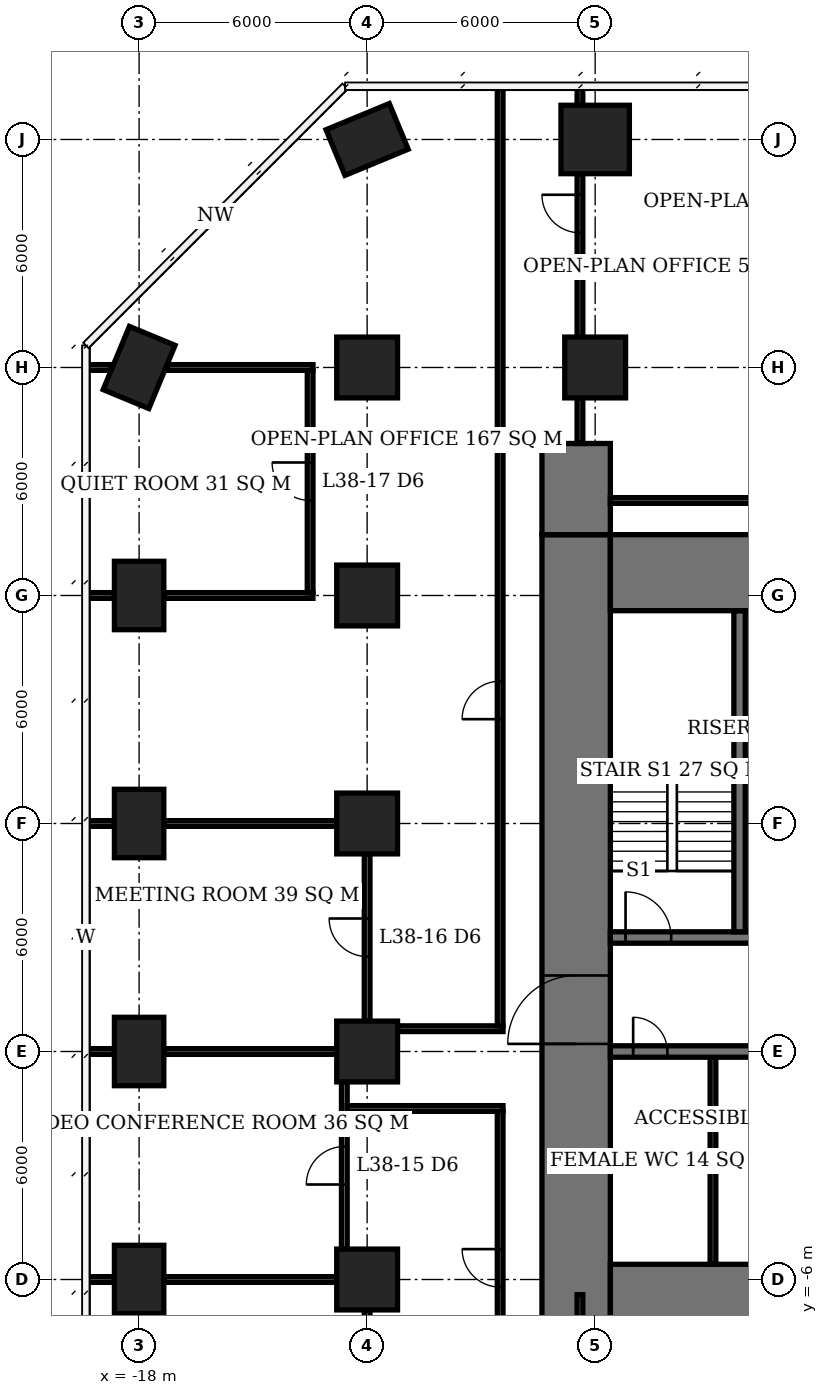
"""IFC4 building model, lengths in metres.
Left out: names, types, materials, properties, quantities, classifications, styles, units other than length and angle.
Written with IfcOpenShell. Run it as: python <this file> out.ifc"""

import sys

from ifc_helpers import new_model, si_unit, direction, frame, frame_2d, origin, origin_2d, place, context, subcontext, project, spatial, rectangle, extrude, element, fill, save


model = new_model("IFC4")
c1 = context("Model", 3, precision=1e-05, world=origin(), true_north=direction((0.0, 1.0)))
c2 = subcontext(c1, "Body", "Model", "MODEL_VIEW")
j1 = project(units=[si_unit("LENGTHUNIT", "METRE"), si_unit("PLANEANGLEUNIT", "RADIAN")], contexts=[c1])
p1 = place(None, origin())
s1 = spatial("IfcSite", under=j1, at=p1, CompositionType="ELEMENT")
p2 = place(p1, origin())
s2 = spatial("IfcBuilding", under=s1, at=p2, CompositionType="ELEMENT")
p3 = place(p2, frame((0.0, 0.0, 156.2)))
s3 = spatial("IfcBuildingStorey", under=s2, at=p3, CompositionType="ELEMENT", Elevation=156.2)
for number, where, z_axis, x_axis in (
    (1, (-18.0, -6.0, 0.0), (0.0, 0.0, 1.0), (0.0, 1.0, 0.0)),
    (2, (-18.0, 0.0, 0.0), (0.0, 0.0, 1.0), (0.0, 1.0, 0.0)),
    (3, (-18.0, 6.0, 0.0), (0.0, 0.0, 1.0), (0.0, 1.0, 0.0)),
    (4, (-18.0, 12.0, 0.0), (0.0, 0.0, 1.0), (0.0, 1.0, 0.0)),
    (5, (-18.0, 18.0, 0.0), (0.0, 0.0, 1.0), (0.383, 0.924, 0.0)),
):
    element("IfcColumn", number, at=place(p3, frame(where, z_axis=z_axis, x_axis=x_axis)), inside=s3, PredefinedType="COLUMN", context=c2, shape_type="SweptSolid", body=[
        extrude(rectangle(XDim=1.8, YDim=1.3, at=origin_2d()), origin(), (0.0, 0.0, 1.0), 3.9),
    ])
for number, where, z_axis, x_axis in (
    (6, (-12.0, -6.0, 0.0), (0.0, 0.0, 1.0), (1.0, 0.0, 0.0)),
    (7, (-12.0, 0.0, 0.0), (0.0, 0.0, 1.0), (1.0, 0.0, 0.0)),
    (8, (-12.0, 6.0, 0.0), (0.0, 0.0, 1.0), (1.0, 0.0, 0.0)),
    (9, (-12.0, 12.0, 0.0), (0.0, 0.0, 1.0), (1.0, 0.0, 0.0)),
    (10, (-12.0, 18.0, 0.0), (0.0, 0.0, 1.0), (1.0, 0.0, 0.0)),
):
    element("IfcColumn", number, at=place(p3, frame(where, z_axis=z_axis, x_axis=x_axis)), inside=s3, PredefinedType="COLUMN", context=c2, shape_type="SweptSolid", body=[
        extrude(rectangle(XDim=1.6, YDim=1.6, at=origin_2d()), origin(), (0.0, 0.0, 1.0), 3.9),
    ])
p4 = place(p3, frame((-12.0, 24.0, 0.0), z_axis=(0.0, 0.0, 1.0), x_axis=(0.923879532511, 0.382683432365, 0.0)))
e11 = element("IfcColumn", 11, at=p4, inside=s3, PredefinedType="COLUMN", context=c2, shape_type="SweptSolid", body=[
    extrude(rectangle(XDim=1.8, YDim=1.3, at=origin_2d()), origin(), (0.0, 0.0, 1.0), 3.9),
])
p5 = place(p3, frame((-6.0, 18.0, 0.0), z_axis=(0.0, 0.0, 1.0), x_axis=(1.0, 0.0, 0.0)))
e12 = element("IfcColumn", 12, at=p5, inside=s3, PredefinedType="COLUMN", context=c2, shape_type="SweptSolid", body=[
    extrude(rectangle(XDim=1.6, YDim=1.6, at=origin_2d()), origin(), (0.0, 0.0, 1.0), 3.9),
])
p6 = place(p3, frame((-6.0, 24.0, 0.0), z_axis=(0.0, 0.0, 1.0), x_axis=(1.0, 0.0, 0.0)))
e13 = element("IfcColumn", 13, at=p6, inside=s3, PredefinedType="COLUMN", context=c2, shape_type="SweptSolid", body=[
    extrude(rectangle(XDim=1.8, YDim=1.8, at=origin_2d()), origin(), (0.0, 0.0, 1.0), 3.9),
])
for number, where, z_axis, x_axis in (
    (14, (-5.6, -6.6, 0.0), (0.0, 0.0, 1.0), (1.0, 0.0, 0.0)),
    (15, (-5.6, 12.6, 0.0), (0.0, 0.0, 1.0), (1.0, 0.0, 0.0)),
):
    element("IfcWall", number, at=place(p3, frame(where, z_axis=z_axis, x_axis=x_axis)), inside=s3, PredefinedType="SHEAR", context=c2, shape_type="SweptSolid", body=[
        extrude(rectangle(XDim=23.2, YDim=2.0, at=frame_2d((11.6, 0.0))), origin(), (0.0, 0.0, 1.0), 3.9),
    ])
p7 = place(p3, frame((-6.5, -7.6, 0.0), z_axis=(0.0, 0.0, 1.0), x_axis=(0.0, 1.0, 0.0)))
e16 = element("IfcWall", 16, at=p7, inside=s3, PredefinedType="SHEAR", context=c2, shape_type="SweptSolid", body=[
    extrude(rectangle(XDim=21.2, YDim=1.8, at=frame_2d((10.6, 0.0))), origin(), (0.0, 0.0, 1.0), 3.9),
])
p8 = place(p7, frame((7.8, 0.0, 0.0)))
e17 = element("IfcOpeningElement", 17, at=p8, cuts=e16, PredefinedType="OPENING", context=c2, shape_type="SweptSolid", body=[
    extrude(rectangle(XDim=1.8, YDim=2.4, at=frame_2d((0.9, 1.2))), frame((0.0, 0.91, 0.0), z_axis=(0.0, -1.0, 0.0), x_axis=(1.0, 0.0, 0.0)), (0.0, 0.0, 1.0), 1.82),
])
p9 = place(p3, frame((-6.5, 13.6, 0.0), z_axis=(0.0, 0.0, 1.0), x_axis=(0.0, 1.0, 0.0)))
e18 = element("IfcWall", 18, at=p9, inside=s3, PredefinedType="SHEAR", context=c2, shape_type="SweptSolid", body=[
    extrude(rectangle(XDim=2.4, YDim=1.8, at=frame_2d((1.2, 0.0))), origin(), (0.0, 0.0, 1.0), 3.9),
])
p10 = place(p3, frame((-5.6, 0.0, 0.0), z_axis=(0.0, 0.0, 1.0), x_axis=(1.0, 0.0, 0.0)))
e19 = element("IfcWall", 19, at=p10, inside=s3, PredefinedType="SHEAR", context=c2, shape_type="SweptSolid", body=[
    extrude(rectangle(XDim=17.75, YDim=0.3, at=frame_2d((8.875, 0.0))), origin(), (0.0, 0.0, 1.0), 3.9),
])
p11 = place(p10, frame((0.6, 0.0, 0.0)))
e20 = element("IfcOpeningElement", 20, at=p11, cuts=e19, PredefinedType="OPENING", context=c2, shape_type="SweptSolid", body=[
    extrude(rectangle(XDim=0.9, YDim=2.1, at=frame_2d((0.45, 1.05))), frame((0.0, 0.16, 0.0), z_axis=(0.0, -1.0, 0.0), x_axis=(1.0, 0.0, 0.0)), (0.0, 0.0, 1.0), 0.32),
])
p12 = place(p10, frame((3.7, 0.0, 0.0)))
e21 = element("IfcOpeningElement", 21, at=p12, cuts=e19, PredefinedType="OPENING", context=c2, shape_type="SweptSolid", body=[
    extrude(rectangle(XDim=1.0, YDim=2.1, at=frame_2d((0.5, 1.05))), frame((0.0, 0.16, 0.0), z_axis=(0.0, -1.0, 0.0), x_axis=(1.0, 0.0, 0.0)), (0.0, 0.0, 1.0), 0.32),
])
p13 = place(p10, frame((6.55, 0.0, 0.0)))
e22 = element("IfcOpeningElement", 22, at=p13, cuts=e19, PredefinedType="OPENING", context=c2, shape_type="SweptSolid", body=[
    extrude(rectangle(XDim=1.1, YDim=2.1, at=frame_2d((0.55, 1.05))), frame((0.0, 0.16, 0.0), z_axis=(0.0, -1.0, 0.0), x_axis=(1.0, 0.0, 0.0)), (0.0, 0.0, 1.0), 0.32),
])
p14 = place(p10, frame((9.55, 0.0, 0.0)))
e23 = element("IfcOpeningElement", 23, at=p14, cuts=e19, PredefinedType="OPENING", context=c2, shape_type="SweptSolid", body=[
    extrude(rectangle(XDim=1.1, YDim=2.1, at=frame_2d((0.55, 1.05))), frame((0.0, 0.16, 0.0), z_axis=(0.0, -1.0, 0.0), x_axis=(1.0, 0.0, 0.0)), (0.0, 0.0, 1.0), 0.32),
])
p15 = place(p3, frame((-5.6, 3.0, 0.0), z_axis=(0.0, 0.0, 1.0), x_axis=(1.0, 0.0, 0.0)))
e24 = element("IfcWall", 24, at=p15, inside=s3, PredefinedType="SHEAR", context=c2, shape_type="SweptSolid", body=[
    extrude(rectangle(XDim=5.45, YDim=0.3, at=frame_2d((2.725, 0.0))), origin(), (0.0, 0.0, 1.0), 3.9),
])
p16 = place(p15, frame((0.4, 0.0, 0.0)))
e25 = element("IfcOpeningElement", 25, at=p16, cuts=e24, PredefinedType="OPENING", context=c2, shape_type="SweptSolid", body=[
    extrude(rectangle(XDim=1.2, YDim=2.1, at=frame_2d((0.6, 1.05))), frame((0.0, 0.16, 0.0), z_axis=(0.0, -1.0, 0.0), x_axis=(1.0, 0.0, 0.0)), (0.0, 0.0, 1.0), 0.32),
])
p17 = place(p15, frame((3.95, 0.0, 0.0)))
e26 = element("IfcOpeningElement", 26, at=p17, cuts=e24, PredefinedType="OPENING", context=c2, shape_type="SweptSolid", body=[
    extrude(rectangle(XDim=0.9, YDim=2.1, at=frame_2d((0.45, 1.05))), frame((0.0, 0.16, 0.0), z_axis=(0.0, -1.0, 0.0), x_axis=(1.0, 0.0, 0.0)), (0.0, 0.0, 1.0), 0.32),
])
p18 = place(p3, frame((-2.2, 3.15, 0.0), z_axis=(0.0, 0.0, 1.0), x_axis=(0.0, 1.0, 0.0)))
e27 = element("IfcWall", 27, at=p18, inside=s3, PredefinedType="SHEAR", context=c2, shape_type="SweptSolid", body=[
    extrude(rectangle(XDim=8.45, YDim=0.3, at=frame_2d((4.225, 0.0))), origin(), (0.0, 0.0, 1.0), 3.9),
])
p19 = place(p3, frame((-2.9, -5.6, 0.0), z_axis=(0.0, 0.0, 1.0), x_axis=(0.0, 1.0, 0.0)))
e28 = element("IfcWall", 28, at=p19, inside=s3, PredefinedType="PLUMBINGWALL", context=c2, shape_type="SweptSolid", body=[
    extrude(rectangle(XDim=5.45, YDim=0.15, at=frame_2d((2.725, 0.0))), origin(), (0.0, 0.0, 1.0), 3.65),
])
p20 = place(p3, frame((-19.4, -6.0, 0.0), z_axis=(0.0, 0.0, 1.0), x_axis=(1.0, 0.0, 0.0)))
e29 = element("IfcWall", 29, at=p20, inside=s3, PredefinedType="PARTITIONING", context=c2, shape_type="SweptSolid", body=[
    extrude(rectangle(XDim=0.75, YDim=0.15, at=frame_2d((0.375, 0.0))), origin(), (0.0, 0.0, 1.0), 3.65),
])
p21 = place(p3, frame((-17.35, -6.0, 0.0), z_axis=(0.0, 0.0, 1.0), x_axis=(1.0, 0.0, 0.0)))
e30 = element("IfcWall", 30, at=p21, inside=s3, PredefinedType="PARTITIONING", context=c2, shape_type="SweptSolid", body=[
    extrude(rectangle(XDim=4.55, YDim=0.15, at=frame_2d((2.275, 0.0))), origin(), (0.0, 0.0, 1.0), 3.65),
])
p22 = place(p3, frame((-19.35, 0.0, 0.0), z_axis=(0.0, 0.0, 1.0), x_axis=(1.0, 0.0, 0.0)))
e31 = element("IfcWall", 31, at=p22, inside=s3, PredefinedType="PARTITIONING", context=c2, shape_type="SweptSolid", body=[
    extrude(rectangle(XDim=0.7, YDim=0.15, at=frame_2d((0.35, 0.0))), origin(), (0.0, 0.0, 1.0), 3.65),
])
p23 = place(p3, frame((-17.35, 0.0, 0.0), z_axis=(0.0, 0.0, 1.0), x_axis=(1.0, 0.0, 0.0)))
e32 = element("IfcWall", 32, at=p23, inside=s3, PredefinedType="PARTITIONING", context=c2, shape_type="SweptSolid", body=[
    extrude(rectangle(XDim=4.55, YDim=0.15, at=frame_2d((2.275, 0.0))), origin(), (0.0, 0.0, 1.0), 3.65),
])
p24 = place(p3, frame((-19.35, 6.0, 0.0), z_axis=(0.0, 0.0, 1.0), x_axis=(1.0, 0.0, 0.0)))
e33 = element("IfcWall", 33, at=p24, inside=s3, PredefinedType="PARTITIONING", context=c2, shape_type="SweptSolid", body=[
    extrude(rectangle(XDim=0.7, YDim=0.15, at=frame_2d((0.35, 0.0))), origin(), (0.0, 0.0, 1.0), 3.65),
])
p25 = place(p3, frame((-17.35, 6.0, 0.0), z_axis=(0.0, 0.0, 1.0), x_axis=(1.0, 0.0, 0.0)))
e34 = element("IfcWall", 34, at=p25, inside=s3, PredefinedType="PARTITIONING", context=c2, shape_type="SweptSolid", body=[
    extrude(rectangle(XDim=4.55, YDim=0.15, at=frame_2d((2.275, 0.0))), origin(), (0.0, 0.0, 1.0), 3.65),
])
p26 = place(p3, frame((-19.4, 12.0, 0.0), z_axis=(0.0, 0.0, 1.0), x_axis=(1.0, 0.0, 0.0)))
e35 = element("IfcWall", 35, at=p26, inside=s3, PredefinedType="PARTITIONING", context=c2, shape_type="SweptSolid", body=[
    extrude(rectangle(XDim=0.75, YDim=0.15, at=frame_2d((0.375, 0.0))), origin(), (0.0, 0.0, 1.0), 3.65),
])
p27 = place(p3, frame((-17.35, 12.0, 0.0), z_axis=(0.0, 0.0, 1.0), x_axis=(1.0, 0.0, 0.0)))
e36 = element("IfcWall", 36, at=p27, inside=s3, PredefinedType="PARTITIONING", context=c2, shape_type="SweptSolid", body=[
    extrude(rectangle(XDim=3.925, YDim=0.15, at=frame_2d((1.962, 0.0))), origin(), (0.0, 0.0, 1.0), 3.65),
])
p28 = place(p3, frame((-19.4, 18.0, 0.0), z_axis=(0.0, 0.0, 1.0), x_axis=(1.0, 0.0, 0.0)))
e37 = element("IfcWall", 37, at=p28, inside=s3, PredefinedType="PARTITIONING", context=c2, shape_type="SweptSolid", body=[
    extrude(rectangle(XDim=0.665, YDim=0.15, at=frame_2d((0.333, 0.0))), origin(), (0.0, 0.0, 1.0), 3.65),
])
p29 = place(p3, frame((-17.265, 18.0, 0.0), z_axis=(0.0, 0.0, 1.0), x_axis=(1.0, 0.0, 0.0)))
e38 = element("IfcWall", 38, at=p29, inside=s3, PredefinedType="PARTITIONING", context=c2, shape_type="SweptSolid", body=[
    extrude(rectangle(XDim=3.84, YDim=0.15, at=frame_2d((1.92, 0.0))), origin(), (0.0, 0.0, 1.0), 3.65),
])
p30 = place(p3, frame((-13.5, 12.075, 0.0), z_axis=(0.0, 0.0, 1.0), x_axis=(0.0, 1.0, 0.0)))
e39 = element("IfcWall", 39, at=p30, inside=s3, PredefinedType="PARTITIONING", context=c2, shape_type="SweptSolid", body=[
    extrude(rectangle(XDim=5.85, YDim=0.15, at=frame_2d((2.925, 0.0))), origin(), (0.0, 0.0, 1.0), 3.65),
])
p31 = place(p30, frame((2.425, 0.0, 0.0)))
e40 = element("IfcOpeningElement", 40, at=p31, cuts=e39, PredefinedType="OPENING", context=c2, shape_type="SweptSolid", body=[
    extrude(rectangle(XDim=1.0, YDim=2.1, at=frame_2d((0.5, 1.05))), frame((0.0, 0.085, 0.0), z_axis=(0.0, -1.0, 0.0), x_axis=(1.0, 0.0, 0.0)), (0.0, 0.0, 1.0), 0.17),
])
p32 = place(p3, frame((-12.6, -5.2, 0.0), z_axis=(0.0, 0.0, 1.0), x_axis=(0.0, 1.0, 0.0)))
e41 = element("IfcWall", 41, at=p32, inside=s3, PredefinedType="PARTITIONING", context=c2, shape_type="SweptSolid", body=[
    extrude(rectangle(XDim=4.4, YDim=0.15, at=frame_2d((2.2, 0.0))), origin(), (0.0, 0.0, 1.0), 3.65),
])
p33 = place(p32, frame((1.7, 0.0, 0.0)))
e42 = element("IfcOpeningElement", 42, at=p33, cuts=e41, PredefinedType="OPENING", context=c2, shape_type="SweptSolid", body=[
    extrude(rectangle(XDim=1.0, YDim=2.1, at=frame_2d((0.5, 1.05))), frame((0.0, 0.085, 0.0), z_axis=(0.0, -1.0, 0.0), x_axis=(1.0, 0.0, 0.0)), (0.0, 0.0, 1.0), 0.17),
])
p34 = place(p3, frame((-12.0, -11.2, 0.0), z_axis=(0.0, 0.0, 1.0), x_axis=(0.0, 1.0, 0.0)))
e43 = element("IfcWall", 43, at=p34, inside=s3, PredefinedType="PARTITIONING", context=c2, shape_type="SweptSolid", body=[
    extrude(rectangle(XDim=4.4, YDim=0.15, at=frame_2d((2.2, 0.0))), origin(), (0.0, 0.0, 1.0), 3.65),
])
p35 = place(p34, frame((1.7, 0.0, 0.0)))
e44 = element("IfcOpeningElement", 44, at=p35, cuts=e43, PredefinedType="OPENING", context=c2, shape_type="SweptSolid", body=[
    extrude(rectangle(XDim=1.0, YDim=2.1, at=frame_2d((0.5, 1.05))), frame((0.0, 0.085, 0.0), z_axis=(0.0, -1.0, 0.0), x_axis=(1.0, 0.0, 0.0)), (0.0, 0.0, 1.0), 0.17),
])
p36 = place(p3, frame((-12.0, 0.8, 0.0), z_axis=(0.0, 0.0, 1.0), x_axis=(0.0, 1.0, 0.0)))
e45 = element("IfcWall", 45, at=p36, inside=s3, PredefinedType="PARTITIONING", context=c2, shape_type="SweptSolid", body=[
    extrude(rectangle(XDim=4.4, YDim=0.15, at=frame_2d((2.2, 0.0))), origin(), (0.0, 0.0, 1.0), 3.65),
])
p37 = place(p36, frame((1.7, 0.0, 0.0)))
e46 = element("IfcOpeningElement", 46, at=p37, cuts=e45, PredefinedType="OPENING", context=c2, shape_type="SweptSolid", body=[
    extrude(rectangle(XDim=1.0, YDim=2.1, at=frame_2d((0.5, 1.05))), frame((0.0, 0.085, 0.0), z_axis=(0.0, -1.0, 0.0), x_axis=(1.0, 0.0, 0.0)), (0.0, 0.0, 1.0), 0.17),
])
p38 = place(p3, frame((-12.525, -1.5, 0.0), z_axis=(0.0, 0.0, 1.0), x_axis=(1.0, 0.0, 0.0)))
e47 = element("IfcWall", 47, at=p38, inside=s3, PredefinedType="PARTITIONING", context=c2, shape_type="SweptSolid", body=[
    extrude(rectangle(XDim=4.1, YDim=0.15, at=frame_2d((2.05, 0.0))), origin(), (0.0, 0.0, 1.0), 3.65),
])
p39 = place(p3, frame((-11.2, 0.6, 0.0), z_axis=(0.0, 0.0, 1.0), x_axis=(1.0, 0.0, 0.0)))
e48 = element("IfcWall", 48, at=p39, inside=s3, PredefinedType="PARTITIONING", context=c2, shape_type="SweptSolid", body=[
    extrude(rectangle(XDim=2.775, YDim=0.15, at=frame_2d((1.387, 0.0))), origin(), (0.0, 0.0, 1.0), 3.65),
])
p40 = place(p3, frame((-8.5, -13.425, 0.0), z_axis=(0.0, 0.0, 1.0), x_axis=(0.0, 1.0, 0.0)))
e49 = element("IfcWall", 49, at=p40, inside=s3, PredefinedType="PARTITIONING", context=c2, shape_type="SweptSolid", body=[
    extrude(rectangle(XDim=11.85, YDim=0.15, at=frame_2d((5.925, 0.0))), origin(), (0.0, 0.0, 1.0), 3.65),
])
p41 = place(p40, frame((7.225, 0.0, 0.0)))
e50 = element("IfcOpeningElement", 50, at=p41, cuts=e49, PredefinedType="OPENING", context=c2, shape_type="SweptSolid", body=[
    extrude(rectangle(XDim=1.0, YDim=2.1, at=frame_2d((0.5, 1.05))), frame((0.0, 0.085, 0.0), z_axis=(0.0, -1.0, 0.0), x_axis=(1.0, 0.0, 0.0)), (0.0, 0.0, 1.0), 0.17),
])
p42 = place(p3, frame((-8.5, 0.675, 0.0), z_axis=(0.0, 0.0, 1.0), x_axis=(0.0, 1.0, 0.0)))
e51 = element("IfcWall", 51, at=p42, inside=s3, PredefinedType="PARTITIONING", context=c2, shape_type="SweptSolid", body=[
    extrude(rectangle(XDim=24.725, YDim=0.15, at=frame_2d((12.362, 0.0))), origin(), (0.0, 0.0, 1.0), 3.65),
])
p43 = place(p42, frame((8.07, 0.0, 0.0)))
e52 = element("IfcOpeningElement", 52, at=p43, cuts=e51, PredefinedType="OPENING", context=c2, shape_type="SweptSolid", body=[
    extrude(rectangle(XDim=1.0, YDim=2.1, at=frame_2d((0.5, 1.05))), frame((0.0, 0.085, 0.0), z_axis=(0.0, -1.0, 0.0), x_axis=(1.0, 0.0, 0.0)), (0.0, 0.0, 1.0), 0.17),
])
p44 = place(p3, frame((-6.4, -7.6, 0.0), z_axis=(0.0, 0.0, 1.0), x_axis=(0.0, 1.0, 0.0)))
e53 = element("IfcWall", 53, at=p44, inside=s3, PredefinedType="PARTITIONING", context=c2, shape_type="SweptSolid", body=[
    extrude(rectangle(XDim=1.2, YDim=0.15, at=frame_2d((0.6, 0.0))), origin(), (0.0, 0.0, 1.0), 3.65),
])
p45 = place(p3, frame((-6.4, 16.0, 0.0), z_axis=(0.0, 0.0, 1.0), x_axis=(0.0, 1.0, 0.0)))
e54 = element("IfcWall", 54, at=p45, inside=s3, PredefinedType="PARTITIONING", context=c2, shape_type="SweptSolid", body=[
    extrude(rectangle(XDim=1.2, YDim=0.15, at=frame_2d((0.6, 0.0))), origin(), (0.0, 0.0, 1.0), 3.65),
])
p46 = place(p3, frame((-6.4, 18.8, 0.0), z_axis=(0.0, 0.0, 1.0), x_axis=(0.0, 1.0, 0.0)))
e55 = element("IfcWall", 55, at=p46, inside=s3, PredefinedType="PARTITIONING", context=c2, shape_type="SweptSolid", body=[
    extrude(rectangle(XDim=4.3, YDim=0.15, at=frame_2d((2.15, 0.0))), origin(), (0.0, 0.0, 1.0), 3.65),
])
p47 = place(p46, frame((2.745, 0.0, 0.0)))
e56 = element("IfcOpeningElement", 56, at=p47, cuts=e55, PredefinedType="OPENING", context=c2, shape_type="SweptSolid", body=[
    extrude(rectangle(XDim=1.0, YDim=2.1, at=frame_2d((0.5, 1.05))), frame((0.0, 0.085, 0.0), z_axis=(0.0, -1.0, 0.0), x_axis=(1.0, 0.0, 0.0)), (0.0, 0.0, 1.0), 0.17),
])
p48 = place(p3, frame((-6.4, 24.9, 0.0), z_axis=(0.0, 0.0, 1.0), x_axis=(0.0, 1.0, 0.0)))
e57 = element("IfcWall", 57, at=p48, inside=s3, PredefinedType="PARTITIONING", context=c2, shape_type="SweptSolid", body=[
    extrude(rectangle(XDim=0.45, YDim=0.15, at=frame_2d((0.225, 0.0))), origin(), (0.0, 0.0, 1.0), 3.65),
])
p49 = place(p3, frame((-5.6, 14.5, 0.0), z_axis=(0.0, 0.0, 1.0), x_axis=(1.0, 0.0, 0.0)))
e58 = element("IfcWall", 58, at=p49, inside=s3, PredefinedType="PARTITIONING", context=c2, shape_type="SweptSolid", body=[
    extrude(rectangle(XDim=4.1, YDim=0.15, at=frame_2d((2.05, 0.0))), origin(), (0.0, 0.0, 1.0), 3.65),
])
p50 = place(p8, origin())
e59 = element("IfcDoor", 59, at=p50, inside=s3, OperationType="DOUBLE_DOOR_SINGLE_SWING", PredefinedType="DOOR", context=c2, shape_type="SweptSolid", body=[
    extrude(rectangle(XDim=1.8, YDim=2.4, at=frame_2d((0.9, 1.2))), frame((0.0, 0.025, 0.0), z_axis=(0.0, -1.0, 0.0), x_axis=(1.0, 0.0, 0.0)), (0.0, 0.0, 1.0), 0.05),
])
fill(e17, e59)
p51 = place(p16, origin())
e60 = element("IfcDoor", 60, at=p51, inside=s3, OperationType="SINGLE_SWING_LEFT", PredefinedType="DOOR", context=c2, shape_type="SweptSolid", body=[
    extrude(rectangle(XDim=1.2, YDim=2.1, at=frame_2d((0.6, 1.05))), frame((0.0, 0.025, 0.0), z_axis=(0.0, -1.0, 0.0), x_axis=(1.0, 0.0, 0.0)), (0.0, 0.0, 1.0), 0.05),
])
fill(e25, e60)
p52 = place(p11, origin())
e61 = element("IfcDoor", 61, at=p52, inside=s3, OperationType="SINGLE_SWING_LEFT", PredefinedType="DOOR", context=c2, shape_type="SweptSolid", body=[
    extrude(rectangle(XDim=0.9, YDim=2.1, at=frame_2d((0.45, 1.05))), frame((0.0, 0.025, 0.0), z_axis=(0.0, -1.0, 0.0), x_axis=(1.0, 0.0, 0.0)), (0.0, 0.0, 1.0), 0.05),
])
fill(e20, e61)
p53 = place(p33, origin())
e62 = element("IfcDoor", 62, at=p53, inside=s3, OperationType="SINGLE_SWING_LEFT", PredefinedType="DOOR", context=c2, shape_type="SweptSolid", body=[
    extrude(rectangle(XDim=1.0, YDim=2.1, at=frame_2d((0.5, 1.05))), frame((0.0, 0.025, 0.0), z_axis=(0.0, -1.0, 0.0), x_axis=(1.0, 0.0, 0.0)), (0.0, 0.0, 1.0), 0.05),
])
fill(e42, e62)
p54 = place(p37, origin())
e63 = element("IfcDoor", 63, at=p54, inside=s3, OperationType="SINGLE_SWING_RIGHT", PredefinedType="DOOR", context=c2, shape_type="SweptSolid", body=[
    extrude(rectangle(XDim=1.0, YDim=2.1, at=frame_2d((0.5, 1.05))), frame((0.0, 0.025, 0.0), z_axis=(0.0, -1.0, 0.0), x_axis=(1.0, 0.0, 0.0)), (0.0, 0.0, 1.0), 0.05),
])
fill(e46, e63)
p55 = place(p31, origin())
e64 = element("IfcDoor", 64, at=p55, inside=s3, OperationType="SINGLE_SWING_RIGHT", PredefinedType="DOOR", context=c2, shape_type="SweptSolid", body=[
    extrude(rectangle(XDim=1.0, YDim=2.1, at=frame_2d((0.5, 1.05))), frame((0.0, 0.025, 0.0), z_axis=(0.0, -1.0, 0.0), x_axis=(1.0, 0.0, 0.0)), (0.0, 0.0, 1.0), 0.05),
])
fill(e40, e64)
p56 = place(p41, origin())
e65 = element("IfcDoor", 65, at=p56, inside=s3, OperationType="SINGLE_SWING_RIGHT", PredefinedType="DOOR", context=c2, shape_type="SweptSolid", body=[
    extrude(rectangle(XDim=1.0, YDim=2.1, at=frame_2d((0.5, 1.05))), frame((0.0, 0.025, 0.0), z_axis=(0.0, -1.0, 0.0), x_axis=(1.0, 0.0, 0.0)), (0.0, 0.0, 1.0), 0.05),
])
fill(e50, e65)
p57 = place(p43, origin())
e66 = element("IfcDoor", 66, at=p57, inside=s3, OperationType="SINGLE_SWING_LEFT", PredefinedType="DOOR", context=c2, shape_type="SweptSolid", body=[
    extrude(rectangle(XDim=1.0, YDim=2.1, at=frame_2d((0.5, 1.05))), frame((0.0, 0.025, 0.0), z_axis=(0.0, -1.0, 0.0), x_axis=(1.0, 0.0, 0.0)), (0.0, 0.0, 1.0), 0.05),
])
fill(e52, e66)
p58 = place(p47, origin())
e67 = element("IfcDoor", 67, at=p58, inside=s3, OperationType="SINGLE_SWING_RIGHT", PredefinedType="DOOR", context=c2, shape_type="SweptSolid", body=[
    extrude(rectangle(XDim=1.0, YDim=2.1, at=frame_2d((0.5, 1.05))), frame((0.0, 0.025, 0.0), z_axis=(0.0, -1.0, 0.0), x_axis=(1.0, 0.0, 0.0)), (0.0, 0.0, 1.0), 0.05),
])
fill(e56, e67)
save(model, sys.argv[1])
